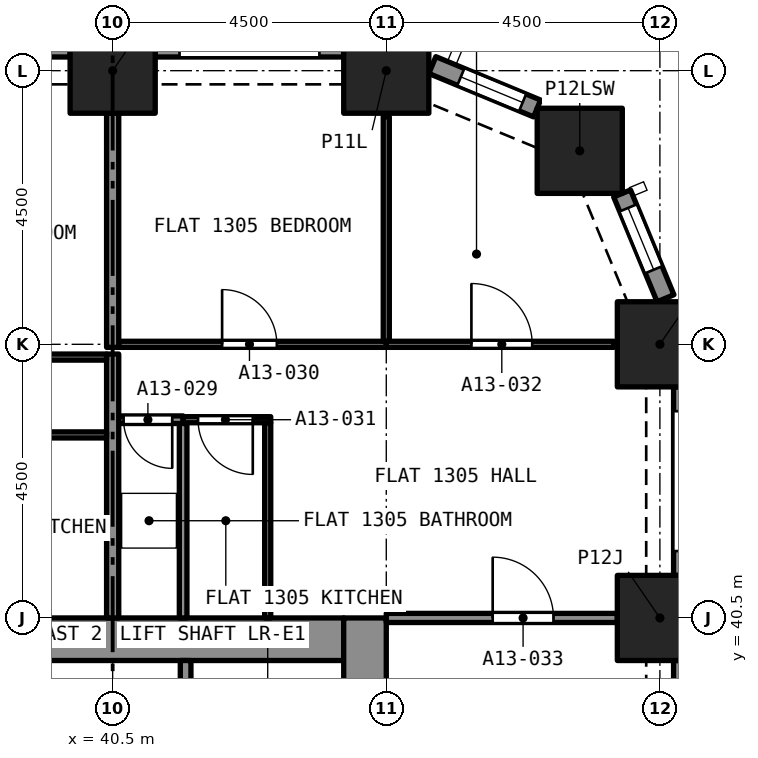
"""IFC4 building model, lengths in metres.
Left out: names, types, materials, properties, quantities, classifications, styles, units other than length and angle.
Written with IfcOpenShell. Run it as: python <this file> out.ifc"""

import sys

from ifc_helpers import new_model, si_unit, direction, frame, frame_2d, origin, origin_2d, place, context, subcontext, project, spatial, rectangle, extrude, element, fill, save


model = new_model("IFC4")
c1 = context("Model", 3, precision=1e-05, world=origin(), true_north=direction((0.0, 1.0)))
c2 = subcontext(c1, "Body", "Model", "MODEL_VIEW")
j1 = project(units=[si_unit("LENGTHUNIT", "METRE"), si_unit("PLANEANGLEUNIT", "RADIAN")], contexts=[c1])
p1 = place(None, origin())
s1 = spatial("IfcSite", under=j1, at=p1, CompositionType="ELEMENT")
p2 = place(p1, origin())
s2 = spatial("IfcBuilding", under=s1, at=p2, CompositionType="ELEMENT")
p3 = place(p2, frame((0.0, 0.0, 52.8)))
s3 = spatial("IfcBuildingStorey", under=s2, at=p3, CompositionType="ELEMENT", Elevation=52.8)
for number, where, z_axis, x_axis in (
    (1, (49.5, 40.5, 0.0), (0.0, 0.0, 1.0), (1.0, 0.0, 0.0)),
    (2, (49.5, 45.0, 0.0), (0.0, 0.0, 1.0), (1.0, 0.0, 0.0)),
    (3, (48.182, 48.182, 0.0), (0.0, 0.0, 1.0), (1.0, 0.0, 0.0)),
    (4, (40.5, 49.5, 0.0), (0.0, 0.0, 1.0), (1.0, 0.0, 0.0)),
    (5, (45.0, 49.5, 0.0), (0.0, 0.0, 1.0), (1.0, 0.0, 0.0)),
):
    element("IfcColumn", number, at=place(p3, frame(where, z_axis=z_axis, x_axis=x_axis)), inside=s3, PredefinedType="COLUMN", context=c2, shape_type="SweptSolid", body=[
        extrude(rectangle(XDim=1.4, YDim=1.4, at=origin_2d()), origin(), (0.0, 0.0, 1.0), 3.2),
    ])
p4 = place(p3, frame((36.7, 40.15, 0.0), z_axis=(0.0, 0.0, 1.0), x_axis=(1.0, 0.0, 0.0)))
e6 = element("IfcWall", 6, at=p4, inside=s3, PredefinedType="SOLIDWALL", context=c2, shape_type="SweptSolid", body=[
    extrude(rectangle(XDim=7.6, YDim=0.7, at=frame_2d((3.8, 0.0))), origin(), (0.0, 0.0, 1.0), 3.2),
])
p5 = place(p3, frame((44.65, 27.0, 0.0), z_axis=(0.0, 0.0, 1.0), x_axis=(0.0, 1.0, 0.0)))
e7 = element("IfcWall", 7, at=p5, inside=s3, PredefinedType="SOLIDWALL", context=c2, shape_type="SweptSolid", body=[
    extrude(rectangle(XDim=13.5, YDim=0.7, at=frame_2d((6.75, 0.0))), origin(), (0.0, 0.0, 1.0), 3.2),
])
p6 = place(p5, frame((8.95, 0.0, 0.0)))
e8 = element("IfcOpeningElement", 8, at=p6, cuts=e7, PredefinedType="OPENING", context=c2, shape_type="SweptSolid", body=[
    extrude(rectangle(XDim=1.2, YDim=2.1, at=frame_2d((0.6, 1.05))), frame((0.0, 0.36, 0.0), z_axis=(0.0, -1.0, 0.0), x_axis=(1.0, 0.0, 0.0)), (0.0, 0.0, 1.0), 0.72),
])
p7 = place(p3, frame((49.875, 39.8, 0.0), z_axis=(0.0, 0.0, 1.0), x_axis=(0.0, -1.0, 0.0)))
e9 = element("IfcWall", 9, at=p7, inside=s3, PredefinedType="SOLIDWALL", context=c2, shape_type="SweptSolid", body=[
    extrude(rectangle(XDim=3.1, YDim=0.3, at=frame_2d((1.55, 0.0))), origin(), (0.0, 0.0, 1.0), 3.2),
])
p8 = place(p7, frame((0.4, 0.0, 0.45)))
e10 = element("IfcOpeningElement", 10, at=p8, cuts=e9, PredefinedType="OPENING", context=c2, shape_type="SweptSolid", body=[
    extrude(rectangle(XDim=2.3, YDim=1.95, at=frame_2d((1.15, 0.975))), frame((0.0, 0.16, 0.0), z_axis=(0.0, -1.0, 0.0), x_axis=(1.0, 0.0, 0.0)), (0.0, 0.0, 1.0), 0.32),
])
p9 = place(p3, frame((49.875, 44.3, 0.0), z_axis=(0.0, 0.0, 1.0), x_axis=(0.0, -1.0, 0.0)))
e11 = element("IfcWall", 11, at=p9, inside=s3, PredefinedType="SOLIDWALL", context=c2, shape_type="SweptSolid", body=[
    extrude(rectangle(XDim=3.1, YDim=0.3, at=frame_2d((1.55, 0.0))), origin(), (0.0, 0.0, 1.0), 3.2),
])
p10 = place(p9, frame((0.4, 0.0, 0.45)))
e12 = element("IfcOpeningElement", 12, at=p10, cuts=e11, PredefinedType="OPENING", context=c2, shape_type="SweptSolid", body=[
    extrude(rectangle(XDim=2.3, YDim=1.95, at=frame_2d((1.15, 0.975))), frame((0.0, 0.16, 0.0), z_axis=(0.0, -1.0, 0.0), x_axis=(1.0, 0.0, 0.0)), (0.0, 0.0, 1.0), 0.32),
])
p11 = place(p3, frame((48.878, 47.48, 0.0), z_axis=(0.0, 0.0, 1.0), x_axis=(0.38262540684, -0.923903565336, 0.0)))
e13 = element("IfcWall", 13, at=p11, inside=s3, PredefinedType="SOLIDWALL", context=c2, shape_type="SweptSolid", body=[
    extrude(rectangle(XDim=1.865, YDim=0.3, at=frame_2d((0.933, 0.0))), origin(), (0.0, 0.0, 1.0), 3.2),
])
p12 = place(p11, frame((0.258, 0.0, 0.45)))
e14 = element("IfcOpeningElement", 14, at=p12, cuts=e13, PredefinedType="OPENING", context=c2, shape_type="SweptSolid", body=[
    extrude(rectangle(XDim=1.1, YDim=1.95, at=frame_2d((0.55, 0.975))), frame((0.0, 0.16, 0.0), z_axis=(0.0, -1.0, 0.0), x_axis=(1.0, 0.0, 0.0)), (0.0, 0.0, 1.0), 0.32),
])
p13 = place(p3, frame((45.757, 49.592, 0.0), z_axis=(0.0, 0.0, 1.0), x_axis=(0.923857286003, -0.382737135771, 0.0)))
e15 = element("IfcWall", 15, at=p13, inside=s3, PredefinedType="SOLIDWALL", context=c2, shape_type="SweptSolid", body=[
    extrude(rectangle(XDim=1.865, YDim=0.3, at=frame_2d((0.933, 0.0))), origin(), (0.0, 0.0, 1.0), 3.2),
])
p14 = place(p13, frame((0.508, 0.0, 0.45)))
e16 = element("IfcOpeningElement", 16, at=p14, cuts=e15, PredefinedType="OPENING", context=c2, shape_type="SweptSolid", body=[
    extrude(rectangle(XDim=1.1, YDim=1.95, at=frame_2d((0.55, 0.975))), frame((0.0, 0.16, 0.0), z_axis=(0.0, -1.0, 0.0), x_axis=(1.0, 0.0, 0.0)), (0.0, 0.0, 1.0), 0.32),
])
p15 = place(p3, frame((41.2, 49.875, 0.0), z_axis=(0.0, 0.0, 1.0), x_axis=(1.0, 0.0, 0.0)))
e17 = element("IfcWall", 17, at=p15, inside=s3, PredefinedType="SOLIDWALL", context=c2, shape_type="SweptSolid", body=[
    extrude(rectangle(XDim=3.1, YDim=0.3, at=frame_2d((1.55, 0.0))), origin(), (0.0, 0.0, 1.0), 3.2),
])
p16 = place(p15, frame((0.4, 0.0, 0.45)))
e18 = element("IfcOpeningElement", 18, at=p16, cuts=e17, PredefinedType="OPENING", context=c2, shape_type="SweptSolid", body=[
    extrude(rectangle(XDim=2.3, YDim=1.95, at=frame_2d((1.15, 0.975))), frame((0.0, 0.16, 0.0), z_axis=(0.0, -1.0, 0.0), x_axis=(1.0, 0.0, 0.0)), (0.0, 0.0, 1.0), 0.32),
])
p17 = place(p3, frame((36.7, 49.875, 0.0), z_axis=(0.0, 0.0, 1.0), x_axis=(1.0, 0.0, 0.0)))
e19 = element("IfcWall", 19, at=p17, inside=s3, PredefinedType="SOLIDWALL", context=c2, shape_type="SweptSolid", body=[
    extrude(rectangle(XDim=3.1, YDim=0.3, at=frame_2d((1.55, 0.0))), origin(), (0.0, 0.0, 1.0), 3.2),
])
p18 = place(p17, frame((0.4, 0.0, 0.45)))
e20 = element("IfcOpeningElement", 20, at=p18, cuts=e19, PredefinedType="OPENING", context=c2, shape_type="SweptSolid", body=[
    extrude(rectangle(XDim=2.3, YDim=1.95, at=frame_2d((1.15, 0.975))), frame((0.0, 0.16, 0.0), z_axis=(0.0, -1.0, 0.0), x_axis=(1.0, 0.0, 0.0)), (0.0, 0.0, 1.0), 0.32),
])
p19 = place(p3, frame((41.659, 43.76, 0.0), z_axis=(0.0, 0.0, 1.0), x_axis=(-1.0, 0.0, 0.0)))
e21 = element("IfcWall", 21, at=p19, inside=s3, PredefinedType="PARTITIONING", context=c2, shape_type="SweptSolid", body=[
    extrude(rectangle(XDim=1.059, YDim=0.125, at=frame_2d((0.53, 0.0))), origin(), (0.0, 0.0, 1.0), 2.9),
])
p20 = place(p19, frame((0.179, 0.0, 0.0)))
e22 = element("IfcOpeningElement", 22, at=p20, cuts=e21, PredefinedType="OPENING", context=c2, shape_type="SweptSolid", body=[
    extrude(rectangle(XDim=0.8, YDim=2.1, at=frame_2d((0.4, 1.05))), frame((0.0, 0.073, 0.0), z_axis=(0.0, -1.0, 0.0), x_axis=(1.0, 0.0, 0.0)), (0.0, 0.0, 1.0), 0.145),
])
p21 = place(p3, frame((41.659, 40.5, 0.0), z_axis=(0.0, 0.0, 1.0), x_axis=(0.0, 1.0, 0.0)))
e23 = element("IfcWall", 23, at=p21, inside=s3, PredefinedType="PARTITIONING", context=c2, shape_type="SweptSolid", body=[
    extrude(rectangle(XDim=3.198, YDim=0.125, at=frame_2d((1.599, 0.0))), origin(), (0.0, 0.0, 1.0), 2.9),
])
p22 = place(p3, frame((40.5, 40.5, 0.0), z_axis=(0.0, 0.0, 1.0), x_axis=(0.0, 1.0, 0.0)))
e24 = element("IfcWall", 24, at=p22, inside=s3, PredefinedType="PARTITIONING", context=c2, shape_type="SweptSolid", body=[
    extrude(rectangle(XDim=4.34, YDim=0.2, at=frame_2d((2.17, 0.0))), origin(), (0.0, 0.0, 1.0), 2.9),
])
p23 = place(p3, frame((40.6, 45.0, 0.0), z_axis=(0.0, 0.0, 1.0), x_axis=(1.0, 0.0, 0.0)))
e25 = element("IfcWall", 25, at=p23, inside=s3, PredefinedType="PARTITIONING", context=c2, shape_type="SweptSolid", body=[
    extrude(rectangle(XDim=4.4, YDim=0.1, at=frame_2d((2.2, 0.0))), origin(), (0.0, 0.0, 1.0), 2.9),
])
p24 = place(p23, frame((1.7, 0.0, 0.0)))
e26 = element("IfcOpeningElement", 26, at=p24, cuts=e25, PredefinedType="OPENING", context=c2, shape_type="SweptSolid", body=[
    extrude(rectangle(XDim=0.9, YDim=2.1, at=frame_2d((0.45, 1.05))), frame((0.0, 0.06, 0.0), z_axis=(0.0, -1.0, 0.0), x_axis=(1.0, 0.0, 0.0)), (0.0, 0.0, 1.0), 0.12),
])
p25 = place(p3, frame((45.0, 45.05, 0.0), z_axis=(0.0, 0.0, 1.0), x_axis=(0.0, 1.0, 0.0)))
e27 = element("IfcWall", 27, at=p25, inside=s3, PredefinedType="PARTITIONING", context=c2, shape_type="SweptSolid", body=[
    extrude(rectangle(XDim=3.692, YDim=0.1, at=frame_2d((1.846, 0.0))), origin(), (0.0, 0.0, 1.0), 2.9),
])
p26 = place(p3, frame((40.5, 44.95, 0.0), z_axis=(0.0, 0.0, 1.0), x_axis=(0.0, 1.0, 0.0)))
e28 = element("IfcWall", 28, at=p26, inside=s3, PredefinedType="PARTITIONING", context=c2, shape_type="SweptSolid", body=[
    extrude(rectangle(XDim=3.85, YDim=0.2, at=frame_2d((1.925, 0.0))), origin(), (0.0, 0.0, 1.0), 2.9),
])
p27 = place(p3, frame((43.05, 40.5, 0.0), z_axis=(0.0, 0.0, 1.0), x_axis=(0.0, 1.0, 0.0)))
e29 = element("IfcWall", 29, at=p27, inside=s3, PredefinedType="PARTITIONING", context=c2, shape_type="SweptSolid", body=[
    extrude(rectangle(XDim=3.21, YDim=0.1, at=frame_2d((1.605, 0.0))), origin(), (0.0, 0.0, 1.0), 2.9),
])
p28 = place(p3, frame((43.1, 43.76, 0.0), z_axis=(0.0, 0.0, 1.0), x_axis=(-1.0, 0.0, 0.0)))
e30 = element("IfcWall", 30, at=p28, inside=s3, PredefinedType="PARTITIONING", context=c2, shape_type="SweptSolid", body=[
    extrude(rectangle(XDim=1.441, YDim=0.1, at=frame_2d((0.72, 0.0))), origin(), (0.0, 0.0, 1.0), 2.9),
])
p29 = place(p28, frame((0.295, 0.0, 0.0)))
e31 = element("IfcOpeningElement", 31, at=p29, cuts=e30, PredefinedType="OPENING", context=c2, shape_type="SweptSolid", body=[
    extrude(rectangle(XDim=0.9, YDim=2.1, at=frame_2d((0.45, 1.05))), frame((0.0, 0.06, 0.0), z_axis=(0.0, -1.0, 0.0), x_axis=(1.0, 0.0, 0.0)), (0.0, 0.0, 1.0), 0.12),
])
p30 = place(p3, frame((45.0, 45.0, 0.0), z_axis=(0.0, 0.0, 1.0), x_axis=(1.0, 0.0, 0.0)))
e32 = element("IfcWall", 32, at=p30, inside=s3, PredefinedType="PARTITIONING", context=c2, shape_type="SweptSolid", body=[
    extrude(rectangle(XDim=3.742, YDim=0.1, at=frame_2d((1.871, 0.0))), origin(), (0.0, 0.0, 1.0), 2.9),
])
p31 = place(p30, frame((1.4, 0.0, 0.0)))
e33 = element("IfcOpeningElement", 33, at=p31, cuts=e32, PredefinedType="OPENING", context=c2, shape_type="SweptSolid", body=[
    extrude(rectangle(XDim=1.0, YDim=2.1, at=frame_2d((0.5, 1.05))), frame((0.0, 0.06, 0.0), z_axis=(0.0, -1.0, 0.0), x_axis=(1.0, 0.0, 0.0)), (0.0, 0.0, 1.0), 0.12),
])
p32 = place(p3, frame((45.0, 40.5, 0.0), z_axis=(0.0, 0.0, 1.0), x_axis=(1.0, 0.0, 0.0)))
e34 = element("IfcWall", 34, at=p32, inside=s3, PredefinedType="PARTITIONING", context=c2, shape_type="SweptSolid", body=[
    extrude(rectangle(XDim=3.8, YDim=0.15, at=frame_2d((1.9, 0.0))), origin(), (0.0, 0.0, 1.0), 2.9),
])
p33 = place(p32, frame((1.75, 0.0, 0.0)))
e35 = element("IfcOpeningElement", 35, at=p33, cuts=e34, PredefinedType="OPENING", context=c2, shape_type="SweptSolid", body=[
    extrude(rectangle(XDim=1.0, YDim=2.1, at=frame_2d((0.5, 1.05))), frame((0.0, 0.085, 0.0), z_axis=(0.0, -1.0, 0.0), x_axis=(1.0, 0.0, 0.0)), (0.0, 0.0, 1.0), 0.17),
])
p34 = place(p3, frame((36.0, 44.79, 0.0), z_axis=(0.0, 0.0, 1.0), x_axis=(1.0, 0.0, 0.0)))
e36 = element("IfcWall", 36, at=p34, inside=s3, PredefinedType="PARTITIONING", context=c2, shape_type="SweptSolid", body=[
    extrude(rectangle(XDim=4.4, YDim=0.1, at=frame_2d((2.2, 0.0))), origin(), (0.0, 0.0, 1.0), 2.9),
])
p35 = place(p34, frame((1.8, 0.0, 0.0)))
e37 = element("IfcOpeningElement", 37, at=p35, cuts=e36, PredefinedType="OPENING", context=c2, shape_type="SweptSolid", body=[
    extrude(rectangle(XDim=0.9, YDim=2.1, at=frame_2d((0.45, 1.05))), frame((0.0, 0.06, 0.0), z_axis=(0.0, -1.0, 0.0), x_axis=(1.0, 0.0, 0.0)), (0.0, 0.0, 1.0), 0.12),
])
p36 = place(p3, frame((40.4, 43.51, 0.0), z_axis=(0.0, 0.0, 1.0), x_axis=(-1.0, 0.0, 0.0)))
e38 = element("IfcWall", 38, at=p36, inside=s3, PredefinedType="PARTITIONING", context=c2, shape_type="SweptSolid", body=[
    extrude(rectangle(XDim=3.25, YDim=0.1, at=frame_2d((1.625, 0.0))), origin(), (0.0, 0.0, 1.0), 2.9),
])
p37 = place(p36, frame((1.125, 0.0, 0.0)))
e39 = element("IfcOpeningElement", 39, at=p37, cuts=e38, PredefinedType="OPENING", context=c2, shape_type="SweptSolid", body=[
    extrude(rectangle(XDim=0.9, YDim=2.1, at=frame_2d((0.45, 1.05))), frame((0.0, 0.06, 0.0), z_axis=(0.0, -1.0, 0.0), x_axis=(1.0, 0.0, 0.0)), (0.0, 0.0, 1.0), 0.12),
])
p38 = place(p3, frame((41.7, 37.5, 0.0), z_axis=(0.0, 0.0, 1.0), x_axis=(0.0, 1.0, 0.0)))
e40 = element("IfcWall", 40, at=p38, inside=s3, PredefinedType="SOLIDWALL", context=c2, shape_type="SweptSolid", body=[
    extrude(rectangle(XDim=2.3, YDim=0.175, at=frame_2d((1.15, 0.0))), origin(), (0.0, 0.0, 1.0), 2.9),
])
p39 = place(p12, origin())
e41 = element("IfcWindow", 41, at=p39, inside=s3, PartitioningType="SINGLE_PANEL", PredefinedType="WINDOW", context=c2, shape_type="SweptSolid", body=[
    extrude(rectangle(XDim=1.1, YDim=1.95, at=frame_2d((0.55, 0.975))), frame((0.0, 0.03, 0.0), z_axis=(0.0, -1.0, 0.0), x_axis=(1.0, 0.0, 0.0)), (0.0, 0.0, 1.0), 0.06),
])
fill(e14, e41)
p40 = place(p14, origin())
e42 = element("IfcWindow", 42, at=p40, inside=s3, PartitioningType="SINGLE_PANEL", PredefinedType="WINDOW", context=c2, shape_type="SweptSolid", body=[
    extrude(rectangle(XDim=1.1, YDim=1.95, at=frame_2d((0.55, 0.975))), frame((0.0, 0.03, 0.0), z_axis=(0.0, -1.0, 0.0), x_axis=(1.0, 0.0, 0.0)), (0.0, 0.0, 1.0), 0.06),
])
fill(e16, e42)
p41 = place(p20, origin())
e43 = element("IfcDoor", 43, at=p41, inside=s3, OperationType="SINGLE_SWING_RIGHT", PredefinedType="DOOR", context=c2, shape_type="SweptSolid", body=[
    extrude(rectangle(XDim=0.8, YDim=2.1, at=frame_2d((0.4, 1.05))), frame((0.0, 0.025, 0.0), z_axis=(0.0, -1.0, 0.0), x_axis=(1.0, 0.0, 0.0)), (0.0, 0.0, 1.0), 0.05),
])
fill(e22, e43)
p42 = place(p24, origin())
e44 = element("IfcDoor", 44, at=p42, inside=s3, OperationType="SINGLE_SWING_LEFT", PredefinedType="DOOR", context=c2, shape_type="SweptSolid", body=[
    extrude(rectangle(XDim=0.9, YDim=2.1, at=frame_2d((0.45, 1.05))), frame((0.0, 0.025, 0.0), z_axis=(0.0, -1.0, 0.0), x_axis=(1.0, 0.0, 0.0)), (0.0, 0.0, 1.0), 0.05),
])
fill(e26, e44)
p43 = place(p29, origin())
e45 = element("IfcDoor", 45, at=p43, inside=s3, OperationType="SINGLE_SWING_RIGHT", PredefinedType="DOOR", context=c2, shape_type="SweptSolid", body=[
    extrude(rectangle(XDim=0.9, YDim=2.1, at=frame_2d((0.45, 1.05))), frame((0.0, 0.025, 0.0), z_axis=(0.0, -1.0, 0.0), x_axis=(1.0, 0.0, 0.0)), (0.0, 0.0, 1.0), 0.05),
])
fill(e31, e45)
p44 = place(p31, origin())
e46 = element("IfcDoor", 46, at=p44, inside=s3, OperationType="SINGLE_SWING_RIGHT", PredefinedType="DOOR", context=c2, shape_type="SweptSolid", body=[
    extrude(rectangle(XDim=1.0, YDim=2.1, at=frame_2d((0.5, 1.05))), frame((0.0, 0.025, 0.0), z_axis=(0.0, -1.0, 0.0), x_axis=(1.0, 0.0, 0.0)), (0.0, 0.0, 1.0), 0.05),
])
fill(e33, e46)
p45 = place(p33, origin())
e47 = element("IfcDoor", 47, at=p45, inside=s3, OperationType="SINGLE_SWING_RIGHT", PredefinedType="DOOR", context=c2, shape_type="SweptSolid", body=[
    extrude(rectangle(XDim=1.0, YDim=2.1, at=frame_2d((0.5, 1.05))), frame((0.0, 0.025, 0.0), z_axis=(0.0, -1.0, 0.0), x_axis=(1.0, 0.0, 0.0)), (0.0, 0.0, 1.0), 0.05),
])
fill(e35, e47)
save(model, sys.argv[1])
